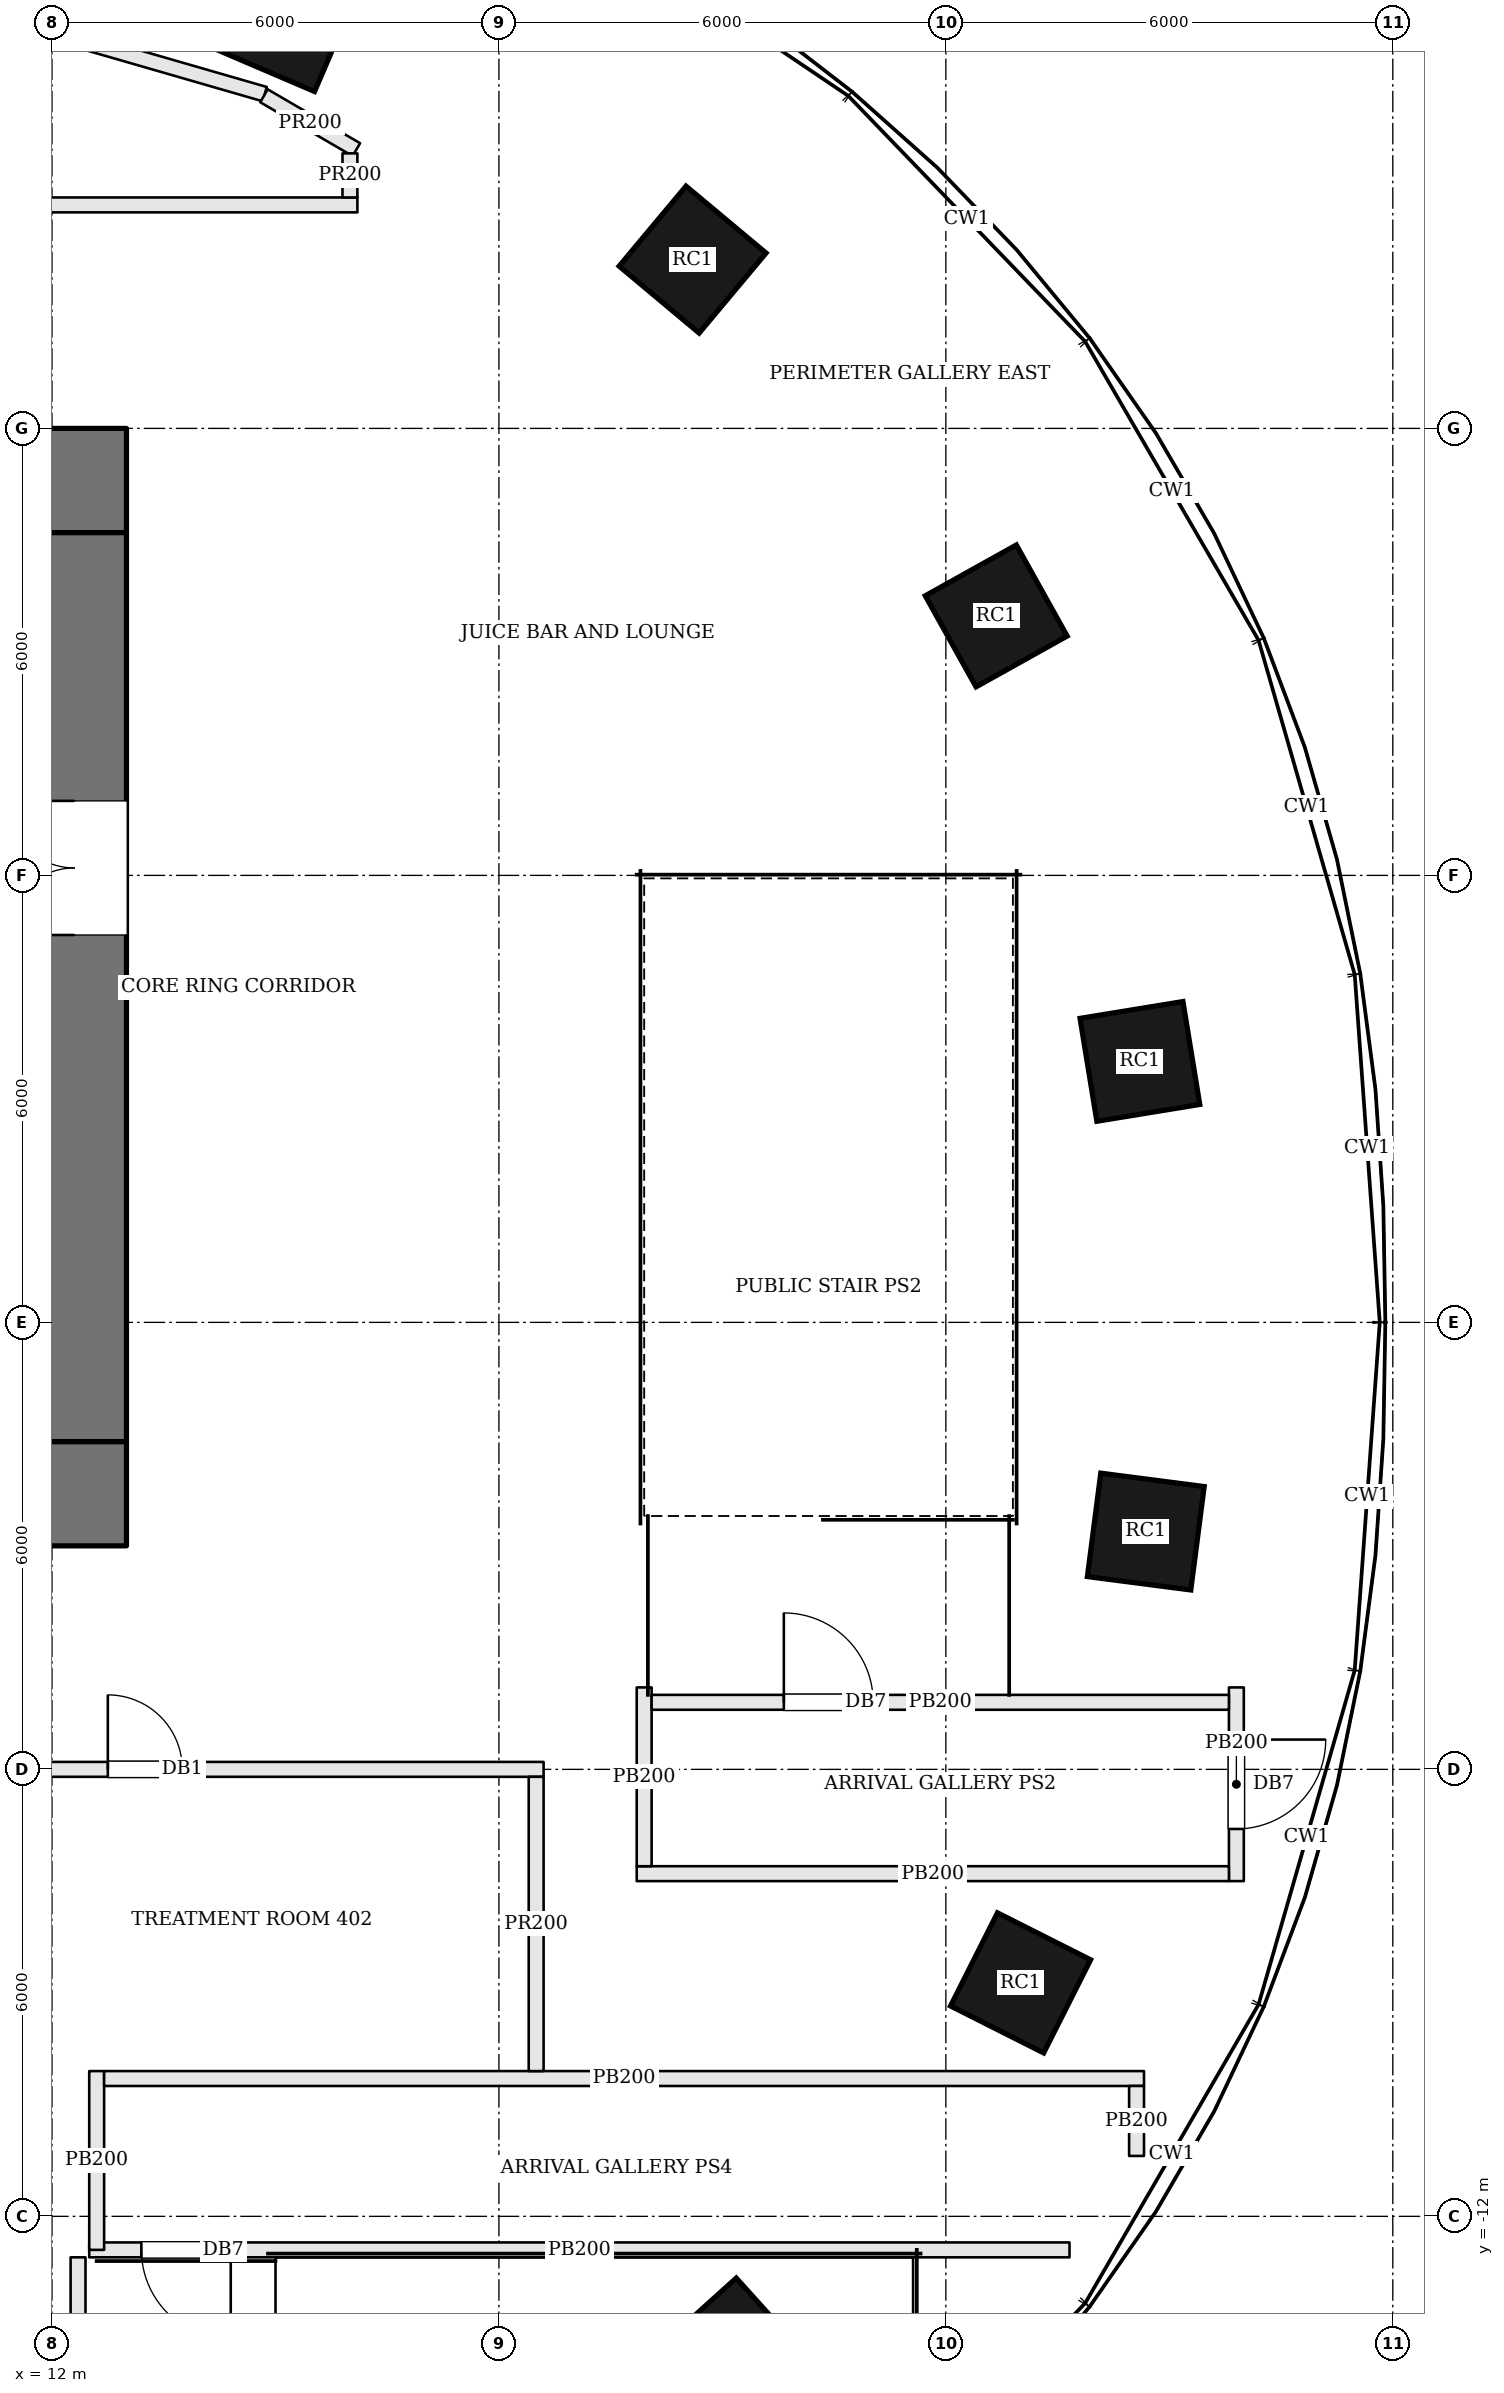
"""IFC4 building model, lengths in metres.
Left out: names, types, materials, properties, quantities, classifications, styles, units other than length and angle.
Written with IfcOpenShell. Run it as: python <this file> out.ifc"""

import sys

from ifc_helpers import new_model, si_unit, direction, frame, frame_2d, origin, origin_2d, place, context, subcontext, project, spatial, rectangle, extrude, element, fill, save


model = new_model("IFC4")
c1 = context("Model", 3, precision=1e-05, world=origin(), true_north=direction((0.0, 1.0)))
c2 = subcontext(c1, "Body", "Model", "MODEL_VIEW")
j1 = project(units=[si_unit("LENGTHUNIT", "METRE"), si_unit("PLANEANGLEUNIT", "RADIAN")], contexts=[c1])
p1 = place(None, origin())
s1 = spatial("IfcSite", under=j1, at=p1, CompositionType="ELEMENT")
p2 = place(p1, origin())
s2 = spatial("IfcBuilding", under=s1, at=p2, CompositionType="ELEMENT")
p3 = place(p2, frame((0.0, 0.0, 28.2)))
s3 = spatial("IfcBuildingStorey", under=s2, at=p3, CompositionType="ELEMENT", Elevation=28.2)
p4 = place(p3, frame((-13.0, 11.3, 0.0), z_axis=(0.0, 0.0, 1.0), x_axis=(1.0, 0.0, 0.0)))
e1 = element("IfcWall", 1, at=p4, inside=s3, PredefinedType="SHEAR", context=c2, shape_type="SweptSolid", body=[
    extrude(rectangle(XDim=26.0, YDim=1.4, at=frame_2d((13.0, 0.0))), origin(), (0.0, 0.0, 1.0), 4.8),
])
p5 = place(p4, frame((8.825, 0.0, 0.0)))
e2 = element("IfcOpeningElement", 2, at=p5, cuts=e1, PredefinedType="OPENING", context=c2, shape_type="SweptSolid", body=[
    extrude(rectangle(XDim=1.0, YDim=2.1, at=frame_2d((0.5, 1.05))), frame((0.0, 0.71, 0.0), z_axis=(0.0, -1.0, 0.0), x_axis=(1.0, 0.0, 0.0)), (0.0, 0.0, 1.0), 1.42),
])
p6 = place(p4, frame((11.425, 0.0, 0.0)))
e3 = element("IfcOpeningElement", 3, at=p6, cuts=e1, PredefinedType="OPENING", context=c2, shape_type="SweptSolid", body=[
    extrude(rectangle(XDim=0.7, YDim=2.1, at=frame_2d((0.35, 1.05))), frame((0.0, 0.71, 0.0), z_axis=(0.0, -1.0, 0.0), x_axis=(1.0, 0.0, 0.0)), (0.0, 0.0, 1.0), 1.42),
])
p7 = place(p4, frame((13.475, 0.0, 0.0)))
e4 = element("IfcOpeningElement", 4, at=p7, cuts=e1, PredefinedType="OPENING", context=c2, shape_type="SweptSolid", body=[
    extrude(rectangle(XDim=0.7, YDim=2.1, at=frame_2d((0.35, 1.05))), frame((0.0, 0.71, 0.0), z_axis=(0.0, -1.0, 0.0), x_axis=(1.0, 0.0, 0.0)), (0.0, 0.0, 1.0), 1.42),
])
p8 = place(p4, frame((14.85, 0.0, 0.0)))
e5 = element("IfcOpeningElement", 5, at=p8, cuts=e1, PredefinedType="OPENING", context=c2, shape_type="SweptSolid", body=[
    extrude(rectangle(XDim=1.0, YDim=2.1, at=frame_2d((0.5, 1.05))), frame((0.0, 0.71, 0.0), z_axis=(0.0, -1.0, 0.0), x_axis=(1.0, 0.0, 0.0)), (0.0, 0.0, 1.0), 1.42),
])
p9 = place(p3, frame((-13.0, -2.3, 0.0), z_axis=(0.0, 0.0, 1.0), x_axis=(1.0, 0.0, 0.0)))
e6 = element("IfcWall", 6, at=p9, inside=s3, PredefinedType="SHEAR", context=c2, shape_type="SweptSolid", body=[
    extrude(rectangle(XDim=26.0, YDim=1.4, at=frame_2d((13.0, 0.0))), origin(), (0.0, 0.0, 1.0), 4.8),
])
p10 = place(p9, frame((9.45, 0.0, 0.0)))
e7 = element("IfcOpeningElement", 7, at=p10, cuts=e6, PredefinedType="OPENING", context=c2, shape_type="SweptSolid", body=[
    extrude(rectangle(XDim=0.9, YDim=2.1, at=frame_2d((0.45, 1.05))), frame((0.0, 0.71, 0.0), z_axis=(0.0, -1.0, 0.0), x_axis=(1.0, 0.0, 0.0)), (0.0, 0.0, 1.0), 1.42),
])
p11 = place(p9, frame((12.7, 0.0, 0.0)))
e8 = element("IfcOpeningElement", 8, at=p11, cuts=e6, PredefinedType="OPENING", context=c2, shape_type="SweptSolid", body=[
    extrude(rectangle(XDim=0.9, YDim=2.1, at=frame_2d((0.45, 1.05))), frame((0.0, 0.71, 0.0), z_axis=(0.0, -1.0, 0.0), x_axis=(1.0, 0.0, 0.0)), (0.0, 0.0, 1.0), 1.42),
])
p12 = place(p9, frame((15.0, 0.0, 0.0)))
e9 = element("IfcOpeningElement", 9, at=p12, cuts=e6, PredefinedType="OPENING", context=c2, shape_type="SweptSolid", body=[
    extrude(rectangle(XDim=1.0, YDim=2.1, at=frame_2d((0.5, 1.05))), frame((0.0, 0.71, 0.0), z_axis=(0.0, -1.0, 0.0), x_axis=(1.0, 0.0, 0.0)), (0.0, 0.0, 1.0), 1.42),
])
p13 = place(p9, frame((16.7, 0.0, 0.0)))
e10 = element("IfcOpeningElement", 10, at=p13, cuts=e6, PredefinedType="OPENING", context=c2, shape_type="SweptSolid", body=[
    extrude(rectangle(XDim=0.9, YDim=2.1, at=frame_2d((0.45, 1.05))), frame((0.0, 0.71, 0.0), z_axis=(0.0, -1.0, 0.0), x_axis=(1.0, 0.0, 0.0)), (0.0, 0.0, 1.0), 1.42),
])
p14 = place(p3, frame((12.3, -1.6, 0.0), z_axis=(0.0, 0.0, 1.0), x_axis=(0.0, 1.0, 0.0)))
e11 = element("IfcWall", 11, at=p14, inside=s3, PredefinedType="SHEAR", context=c2, shape_type="SweptSolid", body=[
    extrude(rectangle(XDim=12.2, YDim=1.4, at=frame_2d((6.1, 0.0))), origin(), (0.0, 0.0, 1.0), 4.8),
])
p15 = place(p14, frame((6.8, 0.0, 0.0)))
e12 = element("IfcOpeningElement", 12, at=p15, cuts=e11, PredefinedType="OPENING", context=c2, shape_type="SweptSolid", body=[
    extrude(rectangle(XDim=1.8, YDim=2.1, at=frame_2d((0.9, 1.05))), frame((0.0, 0.71, 0.0), z_axis=(0.0, -1.0, 0.0), x_axis=(1.0, 0.0, 0.0)), (0.0, 0.0, 1.0), 1.42),
])
for number, where, z_axis, x_axis in (
    (13, (26.605, 3.503, 0.0), (0.0, 0.0, 1.0), (-0.161, 0.987, 0.0)),
    (14, (24.676, 9.483, 0.0), (0.0, 0.0, 1.0), (-0.487, 0.873, 0.0)),
    (15, (20.6, 14.266, 0.0), (0.0, 0.0, 1.0), (-0.767, 0.641, 0.0)),
    (16, (15.157, 17.441, 0.0), (0.0, 0.0, 1.0), (-0.919, 0.394, 0.0)),
    (17, (21.135, -13.817, 0.0), (0.0, 0.0, 1.0), (0.743, 0.67, 0.0)),
    (18, (25.003, -8.866, 0.0), (0.0, 0.0, 1.0), (0.45, 0.893, 0.0)),
    (19, (26.684, -2.808, 0.0), (0.0, 0.0, 1.0), (0.128, 0.992, 0.0)),
):
    element("IfcColumn", number, at=place(p3, frame(where, z_axis=z_axis, x_axis=x_axis)), inside=s3, PredefinedType="COLUMN", context=c2, shape_type="SweptSolid", body=[
        extrude(rectangle(XDim=1.4, YDim=1.4, at=origin_2d()), origin(), (0.0, 0.0, 1.0), 4.8),
    ])
p16 = place(p3, frame((27.9, -4.9, 0.0), z_axis=(0.0, 0.0, 1.0), x_axis=(0.0, -1.0, 0.0)))
e20 = element("IfcWall", 20, at=p16, inside=s3, PredefinedType="PARTITIONING", context=c2, shape_type="SweptSolid", body=[
    extrude(rectangle(XDim=2.6, YDim=0.2, at=frame_2d((1.3, 0.0))), origin(), (0.0, 0.0, 1.0), 3.78),
])
p17 = place(p16, frame((0.7, 0.0, 0.0)))
e21 = element("IfcOpeningElement", 21, at=p17, cuts=e20, PredefinedType="OPENING", context=c2, shape_type="SweptSolid", body=[
    extrude(rectangle(XDim=1.2, YDim=2.1, at=frame_2d((0.6, 1.05))), frame((0.0, 0.11, 0.0), z_axis=(0.0, -1.0, 0.0), x_axis=(1.0, 0.0, 0.0)), (0.0, 0.0, 1.0), 0.22),
])
p18 = place(p3, frame((27.8, -7.4, 0.0), z_axis=(0.0, 0.0, 1.0), x_axis=(-1.0, 0.0, 0.0)))
e22 = element("IfcWall", 22, at=p18, inside=s3, PredefinedType="PARTITIONING", context=c2, shape_type="SweptSolid", body=[
    extrude(rectangle(XDim=7.95, YDim=0.2, at=frame_2d((3.975, 0.0))), origin(), (0.0, 0.0, 1.0), 3.78),
])
p19 = place(p3, frame((19.95, -7.3, 0.0), z_axis=(0.0, 0.0, 1.0), x_axis=(0.0, 1.0, 0.0)))
e23 = element("IfcWall", 23, at=p19, inside=s3, PredefinedType="PARTITIONING", context=c2, shape_type="SweptSolid", body=[
    extrude(rectangle(XDim=2.4, YDim=0.2, at=frame_2d((1.2, 0.0))), origin(), (0.0, 0.0, 1.0), 3.78),
])
p20 = place(p3, frame((20.05, -5.1, 0.0), z_axis=(0.0, 0.0, 1.0), x_axis=(1.0, 0.0, 0.0)))
e24 = element("IfcWall", 24, at=p20, inside=s3, PredefinedType="PARTITIONING", context=c2, shape_type="SweptSolid", body=[
    extrude(rectangle(XDim=7.75, YDim=0.2, at=frame_2d((3.875, 0.0))), origin(), (0.0, 0.0, 1.0), 3.78),
])
p21 = place(p20, frame((1.775, 0.0, 0.0)))
e25 = element("IfcOpeningElement", 25, at=p21, cuts=e24, PredefinedType="OPENING", context=c2, shape_type="SweptSolid", body=[
    extrude(rectangle(XDim=1.2, YDim=2.1, at=frame_2d((0.6, 1.05))), frame((0.0, 0.11, 0.0), z_axis=(0.0, -1.0, 0.0), x_axis=(1.0, 0.0, 0.0)), (0.0, 0.0, 1.0), 0.22),
])
p22 = place(p3, frame((25.66, -12.45, 0.0), z_axis=(0.0, 0.0, 1.0), x_axis=(-1.0, 0.0, 0.0)))
e26 = element("IfcWall", 26, at=p22, inside=s3, PredefinedType="PARTITIONING", context=c2, shape_type="SweptSolid", body=[
    extrude(rectangle(XDim=13.16, YDim=0.2, at=frame_2d((6.58, 0.0))), origin(), (0.0, 0.0, 1.0), 3.78),
])
p23 = place(p22, frame((11.26, 0.0, 0.0)))
e27 = element("IfcOpeningElement", 27, at=p23, cuts=e26, PredefinedType="OPENING", context=c2, shape_type="SweptSolid", body=[
    extrude(rectangle(XDim=1.2, YDim=2.1, at=frame_2d((0.6, 1.05))), frame((0.0, 0.11, 0.0), z_axis=(0.0, -1.0, 0.0), x_axis=(1.0, 0.0, 0.0)), (0.0, 0.0, 1.0), 0.22),
])
p24 = place(p3, frame((12.6, -12.45, 0.0), z_axis=(0.0, 0.0, 1.0), x_axis=(0.0, 1.0, 0.0)))
e28 = element("IfcWall", 28, at=p24, inside=s3, PredefinedType="PARTITIONING", context=c2, shape_type="SweptSolid", body=[
    extrude(rectangle(XDim=2.4, YDim=0.2, at=frame_2d((1.2, 0.0))), origin(), (0.0, 0.0, 1.0), 3.78),
])
p25 = place(p3, frame((12.7, -10.15, 0.0), z_axis=(0.0, 0.0, 1.0), x_axis=(1.0, 0.0, 0.0)))
e29 = element("IfcWall", 29, at=p25, inside=s3, PredefinedType="PARTITIONING", context=c2, shape_type="SweptSolid", body=[
    extrude(rectangle(XDim=13.96, YDim=0.2, at=frame_2d((6.98, 0.0))), origin(), (0.0, 0.0, 1.0), 3.78),
])
p26 = place(p3, frame((26.56, -10.25, 0.0), z_axis=(0.0, 0.0, 1.0), x_axis=(0.0, -1.0, 0.0)))
e30 = element("IfcWall", 30, at=p26, inside=s3, PredefinedType="PARTITIONING", context=c2, shape_type="SweptSolid", body=[
    extrude(rectangle(XDim=0.939, YDim=0.2, at=frame_2d((0.469, 0.0))), origin(), (0.0, 0.0, 1.0), 3.78),
])
p27 = place(p3, frame((16.1, 15.0, 0.0), z_axis=(0.0, 0.0, 1.0), x_axis=(-1.0, 0.0, 0.0)))
e31 = element("IfcWall", 31, at=p27, inside=s3, PredefinedType="PARTITIONING", context=c2, shape_type="SweptSolid", body=[
    extrude(rectangle(XDim=24.228, YDim=0.2, at=frame_2d((12.114, 0.0))), origin(), (0.0, 0.0, 1.0), 3.78),
])
p28 = place(p27, frame((22.328, 0.0, 0.0)))
e32 = element("IfcOpeningElement", 32, at=p28, cuts=e31, PredefinedType="OPENING", context=c2, shape_type="SweptSolid", body=[
    extrude(rectangle(XDim=1.2, YDim=2.1, at=frame_2d((0.6, 1.05))), frame((0.0, 0.11, 0.0), z_axis=(0.0, -1.0, 0.0), x_axis=(1.0, 0.0, 0.0)), (0.0, 0.0, 1.0), 0.22),
])
p29 = place(p27, frame((18.414, 0.0, 0.0)))
e33 = element("IfcOpeningElement", 33, at=p29, cuts=e31, PredefinedType="OPENING", context=c2, shape_type="SweptSolid", body=[
    extrude(rectangle(XDim=1.0, YDim=2.1, at=frame_2d((0.5, 1.05))), frame((0.0, 0.11, 0.0), z_axis=(0.0, -1.0, 0.0), x_axis=(1.0, 0.0, 0.0)), (0.0, 0.0, 1.0), 0.22),
])
p30 = place(p27, frame((7.6, 0.0, 0.0)))
e34 = element("IfcOpeningElement", 34, at=p30, cuts=e31, PredefinedType="OPENING", context=c2, shape_type="SweptSolid", body=[
    extrude(rectangle(XDim=1.0, YDim=2.1, at=frame_2d((0.5, 1.05))), frame((0.0, 0.11, 0.0), z_axis=(0.0, -1.0, 0.0), x_axis=(1.0, 0.0, 0.0)), (0.0, 0.0, 1.0), 0.22),
])
p31 = place(p3, frame((-7.378, -6.0, 0.0), z_axis=(0.0, 0.0, 1.0), x_axis=(1.0, 0.0, 0.0)))
e35 = element("IfcWall", 35, at=p31, inside=s3, PredefinedType="PARTITIONING", context=c2, shape_type="SweptSolid", body=[
    extrude(rectangle(XDim=25.978, YDim=0.2, at=frame_2d((12.989, 0.0))), origin(), (0.0, 0.0, 1.0), 3.78),
])
p32 = place(p31, frame((0.7, 0.0, 0.0)))
e36 = element("IfcOpeningElement", 36, at=p32, cuts=e35, PredefinedType="OPENING", context=c2, shape_type="SweptSolid", body=[
    extrude(rectangle(XDim=1.2, YDim=2.1, at=frame_2d((0.6, 1.05))), frame((0.0, 0.11, 0.0), z_axis=(0.0, -1.0, 0.0), x_axis=(1.0, 0.0, 0.0)), (0.0, 0.0, 1.0), 0.22),
])
p33 = place(p31, frame((5.939, 0.0, 0.0)))
e37 = element("IfcOpeningElement", 37, at=p33, cuts=e35, PredefinedType="OPENING", context=c2, shape_type="SweptSolid", body=[
    extrude(rectangle(XDim=1.0, YDim=2.1, at=frame_2d((0.5, 1.05))), frame((0.0, 0.11, 0.0), z_axis=(0.0, -1.0, 0.0), x_axis=(1.0, 0.0, 0.0)), (0.0, 0.0, 1.0), 0.22),
])
p34 = place(p31, frame((13.628, 0.0, 0.0)))
e38 = element("IfcOpeningElement", 38, at=p34, cuts=e35, PredefinedType="OPENING", context=c2, shape_type="SweptSolid", body=[
    extrude(rectangle(XDim=1.0, YDim=2.1, at=frame_2d((0.5, 1.05))), frame((0.0, 0.11, 0.0), z_axis=(0.0, -1.0, 0.0), x_axis=(1.0, 0.0, 0.0)), (0.0, 0.0, 1.0), 0.22),
])
p35 = place(p31, frame((20.128, 0.0, 0.0)))
e39 = element("IfcOpeningElement", 39, at=p35, cuts=e35, PredefinedType="OPENING", context=c2, shape_type="SweptSolid", body=[
    extrude(rectangle(XDim=1.0, YDim=2.1, at=frame_2d((0.5, 1.05))), frame((0.0, 0.11, 0.0), z_axis=(0.0, -1.0, 0.0), x_axis=(1.0, 0.0, 0.0)), (0.0, 0.0, 1.0), 0.22),
])
p36 = place(p3, frame((8.997, 18.179, 0.0), z_axis=(0.0, 0.0, 1.0), x_axis=(0.960743591904, -0.277437831982, 0.0)))
e40 = element("IfcWall", 40, at=p36, inside=s3, PredefinedType="PARTITIONING", context=c2, shape_type="SweptSolid", body=[
    extrude(rectangle(XDim=6.098, YDim=0.2, at=frame_2d((3.049, 0.0))), origin(), (0.0, 0.0, 1.0), 3.78),
])
p37 = place(p3, frame((14.846, 16.465, 0.0), z_axis=(0.0, 0.0, 1.0), x_axis=(0.863834413875, -0.503775848375, 0.0)))
e41 = element("IfcWall", 41, at=p37, inside=s3, PredefinedType="PARTITIONING", context=c2, shape_type="SweptSolid", body=[
    extrude(rectangle(XDim=1.436, YDim=0.2, at=frame_2d((0.718, 0.0))), origin(), (0.0, 0.0, 1.0), 3.78),
])
p38 = place(p3, frame((16.0, 15.692, 0.0), z_axis=(0.0, 0.0, 1.0), x_axis=(0.0, -1.0, 0.0)))
e42 = element("IfcWall", 42, at=p38, inside=s3, PredefinedType="PARTITIONING", context=c2, shape_type="SweptSolid", body=[
    extrude(rectangle(XDim=0.592, YDim=0.2, at=frame_2d((0.296, 0.0))), origin(), (0.0, 0.0, 1.0), 3.78),
])
p39 = place(p3, frame((18.5, -6.1, 0.0), z_axis=(0.0, 0.0, 1.0), x_axis=(0.0, -1.0, 0.0)))
e43 = element("IfcWall", 43, at=p39, inside=s3, PredefinedType="PARTITIONING", context=c2, shape_type="SweptSolid", body=[
    extrude(rectangle(XDim=3.95, YDim=0.2, at=frame_2d((1.975, 0.0))), origin(), (0.0, 0.0, 1.0), 3.78),
])
p40 = place(p3, frame((12.35, -12.55, 0.0), z_axis=(0.0, 0.0, 1.0), x_axis=(0.0, -1.0, 0.0)))
e44 = element("IfcWall", 44, at=p40, inside=s3, PredefinedType="PARTITIONING", context=c2, shape_type="SweptSolid", body=[
    extrude(rectangle(XDim=4.551, YDim=0.2, at=frame_2d((2.275, 0.0))), origin(), (0.0, 0.0, 1.0), 3.78),
])
p41 = place(p15, origin())
e45 = element("IfcDoor", 45, at=p41, inside=s3, OperationType="DOUBLE_DOOR_SINGLE_SWING", PredefinedType="DOOR", context=c2, shape_type="SweptSolid", body=[
    extrude(rectangle(XDim=1.8, YDim=2.1, at=frame_2d((0.9, 1.05))), frame((0.0, 0.025, 0.0), z_axis=(0.0, -1.0, 0.0), x_axis=(1.0, 0.0, 0.0)), (0.0, 0.0, 1.0), 0.05),
])
fill(e12, e45)
p42 = place(p21, origin())
e46 = element("IfcDoor", 46, at=p42, inside=s3, OperationType="SINGLE_SWING_LEFT", PredefinedType="DOOR", context=c2, shape_type="SweptSolid", body=[
    extrude(rectangle(XDim=1.2, YDim=2.1, at=frame_2d((0.6, 1.05))), frame((0.0, 0.025, 0.0), z_axis=(0.0, -1.0, 0.0), x_axis=(1.0, 0.0, 0.0)), (0.0, 0.0, 1.0), 0.05),
])
fill(e25, e46)
p43 = place(p17, origin())
e47 = element("IfcDoor", 47, at=p43, inside=s3, OperationType="SINGLE_SWING_LEFT", PredefinedType="DOOR", context=c2, shape_type="SweptSolid", body=[
    extrude(rectangle(XDim=1.2, YDim=2.1, at=frame_2d((0.6, 1.05))), frame((0.0, 0.025, 0.0), z_axis=(0.0, -1.0, 0.0), x_axis=(1.0, 0.0, 0.0)), (0.0, 0.0, 1.0), 0.05),
])
fill(e21, e47)
p44 = place(p23, origin())
e48 = element("IfcDoor", 48, at=p44, inside=s3, OperationType="SINGLE_SWING_LEFT", PredefinedType="DOOR", context=c2, shape_type="SweptSolid", body=[
    extrude(rectangle(XDim=1.2, YDim=2.1, at=frame_2d((0.6, 1.05))), frame((0.0, 0.025, 0.0), z_axis=(0.0, -1.0, 0.0), x_axis=(1.0, 0.0, 0.0)), (0.0, 0.0, 1.0), 0.05),
])
fill(e27, e48)
p45 = place(p35, origin())
e49 = element("IfcDoor", 49, at=p45, inside=s3, OperationType="SINGLE_SWING_LEFT", PredefinedType="DOOR", context=c2, shape_type="SweptSolid", body=[
    extrude(rectangle(XDim=1.0, YDim=2.1, at=frame_2d((0.5, 1.05))), frame((0.0, 0.025, 0.0), z_axis=(0.0, -1.0, 0.0), x_axis=(1.0, 0.0, 0.0)), (0.0, 0.0, 1.0), 0.05),
])
fill(e39, e49)
save(model, sys.argv[1])
